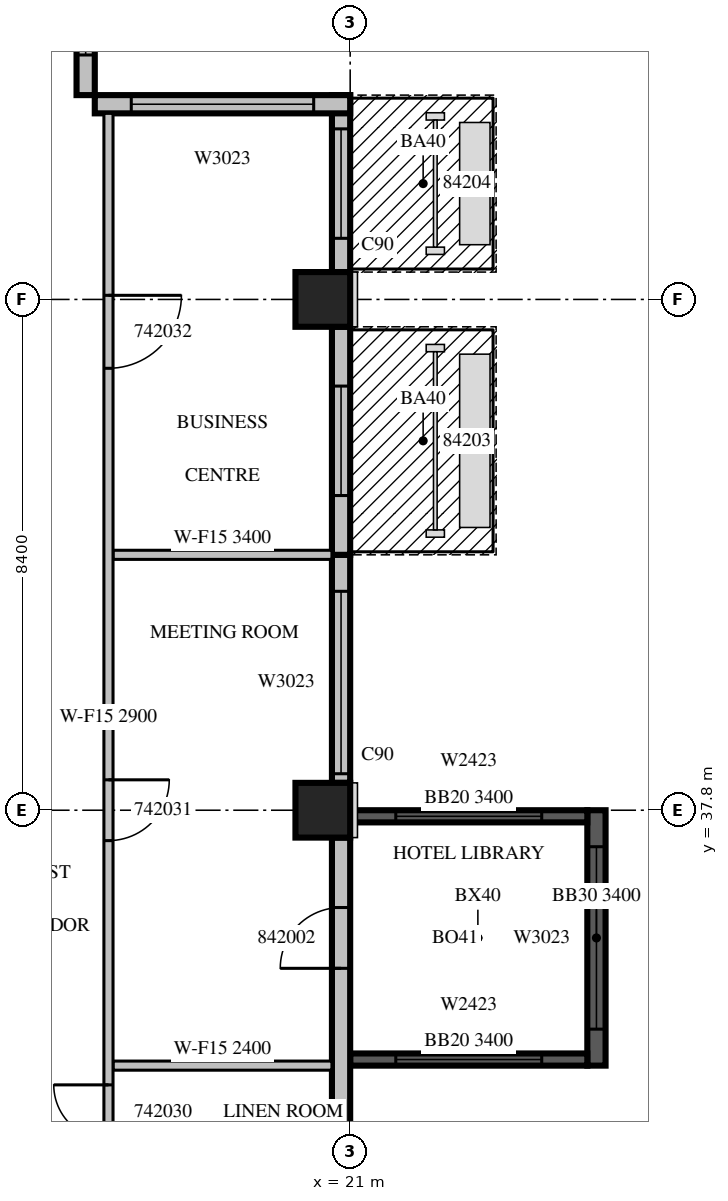
"""IFC4 building model, lengths in metres.
Left out: names, types, materials, properties, quantities, classifications, styles, units other than length and angle.
Written with IfcOpenShell. Run it as: python <this file> out.ifc"""

import sys

from ifc_helpers import new_model, si_unit, direction, frame, frame_2d, origin, origin_2d, place, context, subcontext, project, spatial, rectangle, extrude, source, transform, mapped, element, fill, save


model = new_model("IFC4")
c1 = context("Model", 3, precision=1e-05, world=origin(), true_north=direction((0.0, 1.0)))
c2 = subcontext(c1, "Body", "Model", "MODEL_VIEW")
j1 = project(units=[si_unit("LENGTHUNIT", "METRE"), si_unit("PLANEANGLEUNIT", "RADIAN")], contexts=[c1])
p1 = place(None, origin())
s1 = spatial("IfcSite", under=j1, at=p1, CompositionType="ELEMENT")
p2 = place(p1, origin())
s2 = spatial("IfcBuilding", under=s1, at=p2, CompositionType="ELEMENT")
p3 = place(p2, frame((0.0, 0.0, 193.0)))
s3 = spatial("IfcBuildingStorey", under=s2, at=p3, CompositionType="ELEMENT", Elevation=193.0)
m1 = source(origin(), c2, "Body", "SweptSolid", [
    extrude(rectangle(XDim=0.9, YDim=0.9, at=origin_2d()), origin(), (0.0, 0.0, 1.0), 3.8),
])
for number, where, z_axis, x_axis in (
    (1, (20.55, 37.8, 0.0), (0.0, 0.0, 1.0), (1.0, 0.0, 0.0)),
    (2, (20.55, 46.2, 0.0), (0.0, 0.0, 1.0), (1.0, 0.0, 0.0)),
):
    element("IfcColumn", number, at=place(p3, frame(where, z_axis=z_axis, x_axis=x_axis)), inside=s3, PredefinedType="COLUMN", context=c2, shape_type="MappedRepresentation", body=[
        mapped(m1, transform((0.0, 0.0, 0.0), scale=1.0)),
    ])
m2 = source(origin(), c2, "Body", "SweptSolid", [
    extrude(rectangle(XDim=4.2, YDim=0.3, at=frame_2d((2.1, 0.0))), origin(), (0.0, 0.0, 1.0), 3.4),
])
p4 = place(p3, frame((25.05, 33.6, 0.0), z_axis=(0.0, 0.0, 1.0), x_axis=(0.0, 1.0, 0.0)))
e3 = element("IfcWall", 3, at=p4, inside=s3, PredefinedType="SOLIDWALL", context=c2, shape_type="MappedRepresentation", body=[
    mapped(m2, transform((0.0, 0.0, 0.0), scale=1.0)),
])
m3 = source(origin(), c2, "Body", "SweptSolid", [
    extrude(rectangle(XDim=3.0, YDim=2.3, at=frame_2d((1.5, 1.15))), frame((0.0, 0.16, 0.0), z_axis=(0.0, -1.0, 0.0), x_axis=(1.0, 0.0, 0.0)), (0.0, 0.0, 1.0), 0.32),
])
p5 = place(p4, frame((0.6, 0.0, 0.6)))
e4 = element("IfcOpeningElement", 4, at=p5, cuts=e3, PredefinedType="OPENING", context=c2, shape_type="MappedRepresentation", body=[
    mapped(m3, transform((0.0, 0.0, 0.0), scale=1.0)),
])
m4 = source(origin(), c2, "Body", "SweptSolid", [
    extrude(rectangle(XDim=3.9, YDim=0.2, at=frame_2d((1.95, 0.0))), origin(), (0.0, 0.0, 1.0), 3.4),
])
p6 = place(p3, frame((21.0, 33.7, 0.0), z_axis=(0.0, 0.0, 1.0), x_axis=(1.0, 0.0, 0.0)))
e5 = element("IfcWall", 5, at=p6, inside=s3, PredefinedType="SOLIDWALL", context=c2, shape_type="MappedRepresentation", body=[
    mapped(m4, transform((0.0, 0.0, 0.0), scale=1.0)),
])
m5 = source(origin(), c2, "Body", "SweptSolid", [
    extrude(rectangle(XDim=2.4, YDim=2.3, at=frame_2d((1.2, 1.15))), frame((0.0, 0.11, 0.0), z_axis=(0.0, -1.0, 0.0), x_axis=(1.0, 0.0, 0.0)), (0.0, 0.0, 1.0), 0.22),
])
p7 = place(p6, frame((0.75, 0.0, 0.6)))
e6 = element("IfcOpeningElement", 6, at=p7, cuts=e5, PredefinedType="OPENING", context=c2, shape_type="MappedRepresentation", body=[
    mapped(m5, transform((0.0, 0.0, 0.0), scale=1.0)),
])
p8 = place(p3, frame((21.0, 37.7, 0.0), z_axis=(0.0, 0.0, 1.0), x_axis=(1.0, 0.0, 0.0)))
e7 = element("IfcWall", 7, at=p8, inside=s3, PredefinedType="SOLIDWALL", context=c2, shape_type="MappedRepresentation", body=[
    mapped(m4, transform((0.0, 0.0, 0.0), scale=1.0)),
])
p9 = place(p8, frame((0.75, 0.0, 0.6)))
e8 = element("IfcOpeningElement", 8, at=p9, cuts=e7, PredefinedType="OPENING", context=c2, shape_type="MappedRepresentation", body=[
    mapped(m5, transform((0.0, 0.0, 0.0), scale=1.0)),
])
m6 = source(origin(), c2, "Body", "SweptSolid", [
    extrude(rectangle(XDim=7.5, YDim=0.3, at=frame_2d((3.75, 0.0))), origin(), (0.0, 0.0, 1.0), 3.4),
])
p10 = place(p3, frame((20.85, 29.85, 0.0), z_axis=(0.0, 0.0, 1.0), x_axis=(0.0, 1.0, 0.0)))
e9 = element("IfcWall", 9, at=p10, inside=s3, PredefinedType="STANDARD", context=c2, shape_type="MappedRepresentation", body=[
    mapped(m6, transform((0.0, 0.0, 0.0), scale=1.0)),
])
m7 = source(origin(), c2, "Body", "SweptSolid", [
    extrude(rectangle(XDim=1.2, YDim=2.3, at=frame_2d((0.6, 1.15))), frame((0.0, 0.16, 0.0), z_axis=(0.0, -1.0, 0.0), x_axis=(1.0, 0.0, 0.0)), (0.0, 0.0, 1.0), 0.32),
])
p11 = place(p10, frame((0.496, 0.0, 0.6)))
e10 = element("IfcOpeningElement", 10, at=p11, cuts=e9, PredefinedType="OPENING", context=c2, shape_type="MappedRepresentation", body=[
    mapped(m7, transform((0.0, 0.0, 0.0), scale=1.0)),
])
m8 = source(origin(), c2, "Body", "SweptSolid", [
    extrude(rectangle(XDim=1.0, YDim=2.1, at=frame_2d((0.5, 1.05))), frame((0.0, 0.16, 0.0), z_axis=(0.0, -1.0, 0.0), x_axis=(1.0, 0.0, 0.0)), (0.0, 0.0, 1.0), 0.32),
])
p12 = place(p10, frame((5.35, 0.0, 0.0)))
e11 = element("IfcOpeningElement", 11, at=p12, cuts=e9, PredefinedType="OPENING", context=c2, shape_type="MappedRepresentation", body=[
    mapped(m8, transform((0.0, 0.0, 0.0), scale=1.0)),
])
m9 = source(origin(), c2, "Body", "SweptSolid", [
    extrude(rectangle(XDim=3.75, YDim=0.3, at=frame_2d((1.875, 0.0))), origin(), (0.0, 0.0, 1.0), 3.4),
])
p13 = place(p3, frame((20.85, 38.25, 0.0), z_axis=(0.0, 0.0, 1.0), x_axis=(0.0, 1.0, 0.0)))
e12 = element("IfcWall", 12, at=p13, inside=s3, PredefinedType="STANDARD", context=c2, shape_type="MappedRepresentation", body=[
    mapped(m9, transform((0.0, 0.0, 0.0), scale=1.0)),
])
p14 = place(p13, frame((0.15, 0.0, 0.6)))
e13 = element("IfcOpeningElement", 13, at=p14, cuts=e12, PredefinedType="OPENING", context=c2, shape_type="MappedRepresentation", body=[
    mapped(m3, transform((0.0, 0.0, 0.0), scale=1.0)),
])
p15 = place(p3, frame((20.85, 42.0, 0.0), z_axis=(0.0, 0.0, 1.0), x_axis=(0.0, 1.0, 0.0)))
e14 = element("IfcWall", 14, at=p15, inside=s3, PredefinedType="STANDARD", context=c2, shape_type="MappedRepresentation", body=[
    mapped(m9, transform((0.0, 0.0, 0.0), scale=1.0)),
])
m10 = source(origin(), c2, "Body", "SweptSolid", [
    extrude(rectangle(XDim=1.8, YDim=2.4, at=frame_2d((0.9, 1.2))), frame((0.0, 0.16, 0.0), z_axis=(0.0, -1.0, 0.0), x_axis=(1.0, 0.0, 0.0)), (0.0, 0.0, 1.0), 0.32),
])
p16 = place(p15, frame((0.975, 0.0, 0.0)))
e15 = element("IfcOpeningElement", 15, at=p16, cuts=e14, PredefinedType="OPENING", context=c2, shape_type="MappedRepresentation", body=[
    mapped(m10, transform((0.0, 0.0, 0.0), scale=1.0)),
])
m11 = source(origin(), c2, "Body", "SweptSolid", [
    extrude(rectangle(XDim=2.91, YDim=0.3, at=frame_2d((1.455, 0.0))), origin(), (0.0, 0.0, 1.0), 3.4),
])
p17 = place(p3, frame((20.85, 46.65, 0.0), z_axis=(0.0, 0.0, 1.0), x_axis=(0.0, 1.0, 0.0)))
e16 = element("IfcWall", 16, at=p17, inside=s3, PredefinedType="STANDARD", context=c2, shape_type="MappedRepresentation", body=[
    mapped(m11, transform((0.0, 0.0, 0.0), scale=1.0)),
])
p18 = place(p17, frame((0.555, 0.0, 0.0)))
e17 = element("IfcOpeningElement", 17, at=p18, cuts=e16, PredefinedType="OPENING", context=c2, shape_type="MappedRepresentation", body=[
    mapped(m10, transform((0.0, 0.0, 0.0), scale=1.0)),
])
m12 = source(origin(), c2, "Body", "SweptSolid", [
    extrude(rectangle(XDim=4.2, YDim=0.3, at=frame_2d((2.1, 0.0))), origin(), (0.0, 0.0, 1.0), 3.4),
])
p19 = place(p3, frame((21.0, 49.41, 0.0), z_axis=(0.0, 0.0, 1.0), x_axis=(-1.0, 0.0, 0.0)))
e18 = element("IfcWall", 18, at=p19, inside=s3, PredefinedType="STANDARD", context=c2, shape_type="MappedRepresentation", body=[
    mapped(m12, transform((0.0, 0.0, 0.0), scale=1.0)),
])
p20 = place(p19, frame((0.6, 0.0, 0.6)))
e19 = element("IfcOpeningElement", 19, at=p20, cuts=e18, PredefinedType="OPENING", context=c2, shape_type="MappedRepresentation", body=[
    mapped(m3, transform((0.0, 0.0, 0.0), scale=1.0)),
])
m13 = source(origin(), c2, "Body", "SweptSolid", [
    extrude(rectangle(XDim=2.52, YDim=0.3, at=frame_2d((1.26, 0.0))), origin(), (0.0, 0.0, 1.0), 3.4),
])
p21 = place(p3, frame((16.65, 49.56, 0.0), z_axis=(0.0, 0.0, 1.0), x_axis=(0.0, 1.0, 0.0)))
e20 = element("IfcWall", 20, at=p21, inside=s3, PredefinedType="STANDARD", context=c2, shape_type="MappedRepresentation", body=[
    mapped(m13, transform((0.0, 0.0, 0.0), scale=1.0)),
])
p22 = place(p21, frame((0.66, 0.0, 0.6)))
e21 = element("IfcOpeningElement", 21, at=p22, cuts=e20, PredefinedType="OPENING", context=c2, shape_type="MappedRepresentation", body=[
    mapped(m7, transform((0.0, 0.0, 0.0), scale=1.0)),
])
m14 = source(origin(), c2, "Body", "SweptSolid", [
    extrude(rectangle(XDim=3.6, YDim=0.15, at=frame_2d((1.8, 0.0))), origin(), (0.0, 0.0, 1.0), 2.4),
])
p23 = place(p3, frame((20.7, 33.6, 0.0), z_axis=(0.0, 0.0, 1.0), x_axis=(-1.0, 0.0, 0.0)))
e22 = element("IfcWall", 22, at=p23, inside=s3, PredefinedType="PARTITIONING", context=c2, shape_type="MappedRepresentation", body=[
    mapped(m14, transform((0.0, 0.0, 0.0), scale=1.0)),
])
m15 = source(origin(), c2, "Body", "SweptSolid", [
    extrude(rectangle(XDim=3.6, YDim=0.15, at=frame_2d((1.8, 0.0))), origin(), (0.0, 0.0, 1.0), 3.4),
])
p24 = place(p3, frame((20.7, 42.0, 0.0), z_axis=(0.0, 0.0, 1.0), x_axis=(-1.0, 0.0, 0.0)))
e23 = element("IfcWall", 23, at=p24, inside=s3, PredefinedType="PARTITIONING", context=c2, shape_type="MappedRepresentation", body=[
    mapped(m15, transform((0.0, 0.0, 0.0), scale=1.0)),
])
m16 = source(origin(), c2, "Body", "SweptSolid", [
    extrude(rectangle(XDim=19.86, YDim=0.15, at=frame_2d((9.93, 0.0))), origin(), (0.0, 0.0, 1.0), 2.9),
])
p25 = place(p3, frame((17.025, 49.26, 0.0), z_axis=(0.0, 0.0, 1.0), x_axis=(0.0, -1.0, 0.0)))
e24 = element("IfcWall", 24, at=p25, inside=s3, PredefinedType="PARTITIONING", context=c2, shape_type="MappedRepresentation", body=[
    mapped(m16, transform((0.0, 0.0, 0.0), scale=1.0)),
])
m17 = source(origin(), c2, "Body", "SweptSolid", [
    extrude(rectangle(XDim=0.9, YDim=2.1, at=frame_2d((0.45, 1.05))), frame((0.0, 0.085, 0.0), z_axis=(0.0, -1.0, 0.0), x_axis=(1.0, 0.0, 0.0)), (0.0, 0.0, 1.0), 0.17),
])
p26 = place(p25, frame((18.076, 0.0, 0.0)))
e25 = element("IfcOpeningElement", 25, at=p26, cuts=e24, PredefinedType="OPENING", context=c2, shape_type="MappedRepresentation", body=[
    mapped(m17, transform((0.0, 0.0, 0.0), scale=1.0)),
])
p27 = place(p25, frame((15.976, 0.0, 0.0)))
e26 = element("IfcOpeningElement", 26, at=p27, cuts=e24, PredefinedType="OPENING", context=c2, shape_type="MappedRepresentation", body=[
    mapped(m17, transform((0.0, 0.0, 0.0), scale=1.0)),
])
m18 = source(origin(), c2, "Body", "SweptSolid", [
    extrude(rectangle(XDim=1.0, YDim=2.1, at=frame_2d((0.5, 1.05))), frame((0.0, 0.085, 0.0), z_axis=(0.0, -1.0, 0.0), x_axis=(1.0, 0.0, 0.0)), (0.0, 0.0, 1.0), 0.17),
])
p28 = place(p25, frame((10.96, 0.0, 0.0)))
e27 = element("IfcOpeningElement", 27, at=p28, cuts=e24, PredefinedType="OPENING", context=c2, shape_type="MappedRepresentation", body=[
    mapped(m18, transform((0.0, 0.0, 0.0), scale=1.0)),
])
m19 = source(origin(), c2, "Body", "SweptSolid", [
    extrude(rectangle(XDim=1.2, YDim=2.1, at=frame_2d((0.6, 1.05))), frame((0.0, 0.085, 0.0), z_axis=(0.0, -1.0, 0.0), x_axis=(1.0, 0.0, 0.0)), (0.0, 0.0, 1.0), 0.17),
])
p29 = place(p25, frame((2.993, 0.0, 0.0)))
e28 = element("IfcOpeningElement", 28, at=p29, cuts=e24, PredefinedType="OPENING", context=c2, shape_type="MappedRepresentation", body=[
    mapped(m19, transform((0.0, 0.0, 0.0), scale=1.0)),
])
m20 = source(origin(), c2, "Body", "SweptSolid", [
    extrude(rectangle(XDim=3.0, YDim=2.3, at=frame_2d((1.5, 1.15))), frame((0.0, 0.03, 0.0), z_axis=(0.0, -1.0, 0.0), x_axis=(1.0, 0.0, 0.0)), (0.0, 0.0, 1.0), 0.06),
])
p30 = place(p5, origin())
e29 = element("IfcWindow", 29, at=p30, inside=s3, PartitioningType="SINGLE_PANEL", PredefinedType="WINDOW", context=c2, shape_type="MappedRepresentation", body=[
    mapped(m20, transform((0.0, 0.0, 0.0), scale=1.0)),
])
fill(e4, e29)
m21 = source(origin(), c2, "Body", "SweptSolid", [
    extrude(rectangle(XDim=2.4, YDim=2.3, at=frame_2d((1.2, 1.15))), frame((0.0, 0.03, 0.0), z_axis=(0.0, -1.0, 0.0), x_axis=(1.0, 0.0, 0.0)), (0.0, 0.0, 1.0), 0.06),
])
p31 = place(p7, origin())
e30 = element("IfcWindow", 30, at=p31, inside=s3, PartitioningType="SINGLE_PANEL", PredefinedType="WINDOW", context=c2, shape_type="MappedRepresentation", body=[
    mapped(m21, transform((0.0, 0.0, 0.0), scale=1.0)),
])
fill(e6, e30)
p32 = place(p9, origin())
e31 = element("IfcWindow", 31, at=p32, inside=s3, PartitioningType="SINGLE_PANEL", PredefinedType="WINDOW", context=c2, shape_type="MappedRepresentation", body=[
    mapped(m21, transform((0.0, 0.0, 0.0), scale=1.0)),
])
fill(e8, e31)
p33 = place(p14, origin())
e32 = element("IfcWindow", 32, at=p33, inside=s3, PartitioningType="SINGLE_PANEL", PredefinedType="WINDOW", context=c2, shape_type="MappedRepresentation", body=[
    mapped(m20, transform((0.0, 0.0, 0.0), scale=1.0)),
])
fill(e13, e32)
m22 = source(origin(), c2, "Body", "SweptSolid", [
    extrude(rectangle(XDim=1.8, YDim=2.4, at=frame_2d((0.9, 1.2))), frame((0.0, 0.025, 0.0), z_axis=(0.0, -1.0, 0.0), x_axis=(1.0, 0.0, 0.0)), (0.0, 0.0, 1.0), 0.05),
])
p34 = place(p16, origin())
e33 = element("IfcDoor", 33, at=p34, inside=s3, OperationType="SLIDING_TO_LEFT", PredefinedType="DOOR", context=c2, shape_type="MappedRepresentation", body=[
    mapped(m22, transform((0.0, 0.0, 0.0), scale=1.0)),
])
fill(e15, e33)
p35 = place(p18, origin())
e34 = element("IfcDoor", 34, at=p35, inside=s3, OperationType="SLIDING_TO_LEFT", PredefinedType="DOOR", context=c2, shape_type="MappedRepresentation", body=[
    mapped(m22, transform((0.0, 0.0, 0.0), scale=1.0)),
])
fill(e17, e34)
p36 = place(p20, origin())
e35 = element("IfcWindow", 35, at=p36, inside=s3, PartitioningType="SINGLE_PANEL", PredefinedType="WINDOW", context=c2, shape_type="MappedRepresentation", body=[
    mapped(m20, transform((0.0, 0.0, 0.0), scale=1.0)),
])
fill(e19, e35)
m23 = source(origin(), c2, "Body", "SweptSolid", [
    extrude(rectangle(XDim=1.2, YDim=2.3, at=frame_2d((0.6, 1.15))), frame((0.0, 0.03, 0.0), z_axis=(0.0, -1.0, 0.0), x_axis=(1.0, 0.0, 0.0)), (0.0, 0.0, 1.0), 0.06),
])
p37 = place(p22, origin())
e36 = element("IfcWindow", 36, at=p37, inside=s3, PartitioningType="SINGLE_PANEL", PredefinedType="WINDOW", context=c2, shape_type="MappedRepresentation", body=[
    mapped(m23, transform((0.0, 0.0, 0.0), scale=1.0)),
])
fill(e21, e36)
m24 = source(origin(), c2, "Body", "SweptSolid", [
    extrude(rectangle(XDim=0.9, YDim=2.1, at=frame_2d((0.45, 1.05))), frame((0.0, 0.025, 0.0), z_axis=(0.0, -1.0, 0.0), x_axis=(1.0, 0.0, 0.0)), (0.0, 0.0, 1.0), 0.05),
])
p38 = place(p27, origin())
e37 = element("IfcDoor", 37, at=p38, inside=s3, OperationType="SINGLE_SWING_RIGHT", PredefinedType="DOOR", context=c2, shape_type="MappedRepresentation", body=[
    mapped(m24, transform((0.0, 0.0, 0.0), scale=1.0)),
])
fill(e26, e37)
m25 = source(origin(), c2, "Body", "SweptSolid", [
    extrude(rectangle(XDim=1.0, YDim=2.1, at=frame_2d((0.5, 1.05))), frame((0.0, 0.025, 0.0), z_axis=(0.0, -1.0, 0.0), x_axis=(1.0, 0.0, 0.0)), (0.0, 0.0, 1.0), 0.05),
])
p39 = place(p28, origin())
e38 = element("IfcDoor", 38, at=p39, inside=s3, OperationType="SINGLE_SWING_LEFT", PredefinedType="DOOR", context=c2, shape_type="MappedRepresentation", body=[
    mapped(m25, transform((0.0, 0.0, 0.0), scale=1.0)),
])
fill(e27, e38)
m26 = source(origin(), c2, "Body", "SweptSolid", [
    extrude(rectangle(XDim=1.2, YDim=2.1, at=frame_2d((0.6, 1.05))), frame((0.0, 0.025, 0.0), z_axis=(0.0, -1.0, 0.0), x_axis=(1.0, 0.0, 0.0)), (0.0, 0.0, 1.0), 0.05),
])
p40 = place(p29, origin())
e39 = element("IfcDoor", 39, at=p40, inside=s3, OperationType="SINGLE_SWING_LEFT", PredefinedType="DOOR", context=c2, shape_type="MappedRepresentation", body=[
    mapped(m26, transform((0.0, 0.0, 0.0), scale=1.0)),
])
fill(e28, e39)
p41 = place(p12, origin())
e40 = element("IfcDoor", 40, at=p41, inside=s3, OperationType="SINGLE_SWING_LEFT", PredefinedType="DOOR", context=c2, shape_type="MappedRepresentation", body=[
    mapped(m25, transform((0.0, 0.0, 0.0), scale=1.0)),
])
fill(e11, e40)
save(model, sys.argv[1])
